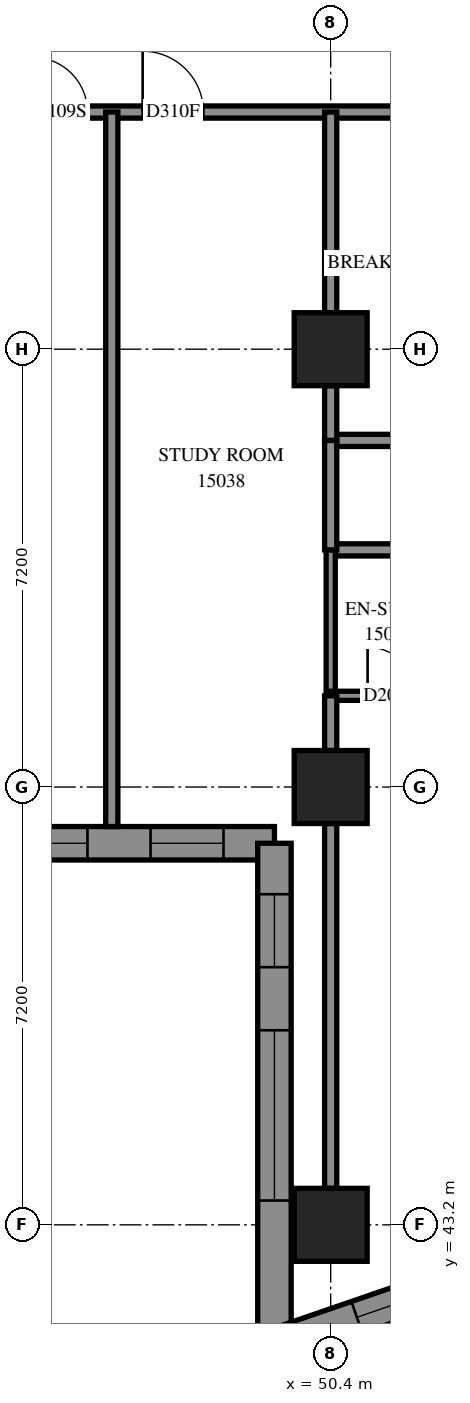
"""IFC4 building model, lengths in metres.
Left out: names, types, materials, properties, quantities, classifications, styles, units other than length and angle.
Written with IfcOpenShell. Run it as: python <this file> out.ifc"""

import sys

from ifc_helpers import new_model, si_unit, direction, frame, frame_2d, origin, origin_2d, place, context, subcontext, project, spatial, polyline, rectangle, outline, extrude, element, fill, save


model = new_model("IFC4")
c1 = context("Model", 3, precision=1e-05, world=origin(), true_north=direction((0.0, 1.0)))
c2 = subcontext(c1, "Body", "Model", "MODEL_VIEW")
j1 = project(units=[si_unit("LENGTHUNIT", "METRE"), si_unit("PLANEANGLEUNIT", "RADIAN")], contexts=[c1])
p1 = place(None, origin())
s1 = spatial("IfcSite", under=j1, at=p1, CompositionType="ELEMENT")
p2 = place(p1, origin())
s2 = spatial("IfcBuilding", under=s1, at=p2, CompositionType="ELEMENT")
p3 = place(p2, frame((0.0, 0.0, 57.6)))
s3 = spatial("IfcBuildingStorey", under=s2, at=p3, CompositionType="ELEMENT", Elevation=57.6)
for number, where, z_axis, x_axis in (
    (1, (50.4, 43.2, 0.0), (0.0, 0.0, 1.0), (1.0, 0.0, 0.0)),
    (2, (50.4, 50.4, 0.0), (0.0, 0.0, 1.0), (1.0, 0.0, 0.0)),
    (3, (50.4, 57.6, 0.0), (0.0, 0.0, 1.0), (1.0, 0.0, 0.0)),
):
    element("IfcColumn", number, at=place(p3, frame(where, z_axis=z_axis, x_axis=x_axis)), inside=s3, PredefinedType="COLUMN", context=c2, shape_type="SweptSolid", body=[
        extrude(rectangle(XDim=1.2, YDim=1.2, at=origin_2d()), origin(), (0.0, 0.0, 1.0), 3.1),
    ])
p4 = place(p3, frame((42.275, 49.475, 0.0), z_axis=(0.0, 0.0, 1.0), x_axis=(1.0, 0.0, 0.0)))
e4 = element("IfcWall", 4, at=p4, inside=s3, PredefinedType="SOLIDWALL", context=c2, shape_type="SweptSolid", body=[
    extrude(outline(polyline([(-0.275, -0.275), (6.925, -0.275), (7.475, 0.275), (0.275, 0.275), (-0.275, -0.275)])), origin(), (0.0, 0.0, 1.0), 3.1),
])
p5 = place(p4, frame((1.325, 0.0, 0.5)))
e5 = element("IfcOpeningElement", 5, at=p5, cuts=e4, PredefinedType="OPENING", context=c2, shape_type="SweptSolid", body=[
    extrude(rectangle(XDim=2.8, YDim=2.45, at=frame_2d((1.4, 1.225))), frame((0.0, 0.285, 0.0), z_axis=(0.0, -1.0, 0.0), x_axis=(1.0, 0.0, 0.0)), (0.0, 0.0, 1.0), 0.57),
])
p6 = place(p4, frame((5.162, 0.0, 0.5)))
e6 = element("IfcOpeningElement", 6, at=p6, cuts=e4, PredefinedType="OPENING", context=c2, shape_type="SweptSolid", body=[
    extrude(rectangle(XDim=1.2, YDim=2.45, at=frame_2d((0.6, 1.225))), frame((0.0, 0.285, 0.0), z_axis=(0.0, -1.0, 0.0), x_axis=(1.0, 0.0, 0.0)), (0.0, 0.0, 1.0), 0.57),
])
p7 = place(p3, frame((49.475, 49.475, 0.0), z_axis=(0.0, 0.0, 1.0), x_axis=(0.0, -1.0, 0.0)))
e7 = element("IfcWall", 7, at=p7, inside=s3, PredefinedType="SOLIDWALL", context=c2, shape_type="SweptSolid", body=[
    extrude(outline(polyline([(0.275, -0.275), (8.647, -0.275), (7.876, 0.275), (-0.275, 0.275), (0.275, -0.275)])), origin(), (0.0, 0.0, 1.0), 3.1),
])
p8 = place(p7, frame((3.075, 0.0, 0.5)))
e8 = element("IfcOpeningElement", 8, at=p8, cuts=e7, PredefinedType="OPENING", context=c2, shape_type="SweptSolid", body=[
    extrude(rectangle(XDim=2.8, YDim=2.45, at=frame_2d((1.4, 1.225))), frame((0.0, 0.285, 0.0), z_axis=(0.0, -1.0, 0.0), x_axis=(1.0, 0.0, 0.0)), (0.0, 0.0, 1.0), 0.57),
])
p9 = place(p7, frame((0.838, 0.0, 0.5)))
e9 = element("IfcOpeningElement", 9, at=p9, cuts=e7, PredefinedType="OPENING", context=c2, shape_type="SweptSolid", body=[
    extrude(rectangle(XDim=1.2, YDim=2.45, at=frame_2d((0.6, 1.225))), frame((0.0, 0.285, 0.0), z_axis=(0.0, -1.0, 0.0), x_axis=(1.0, 0.0, 0.0)), (0.0, 0.0, 1.0), 0.57),
])
p10 = place(p3, frame((49.475, 41.213, 0.0), z_axis=(0.0, 0.0, 1.0), x_axis=(0.9456585559, 0.3251613379, 0.0)))
e10 = element("IfcWall", 10, at=p10, inside=s3, PredefinedType="SOLIDWALL", context=c2, shape_type="SweptSolid", body=[
    extrude(outline(polyline([(-0.385, -0.275), (3.219, -0.275), (3.359, 0.275), (0.385, 0.275), (-0.385, -0.275)])), origin(), (0.0, 0.0, 1.0), 3.1),
])
p11 = place(p10, frame((1.434, 0.0, 0.5)))
e11 = element("IfcOpeningElement", 11, at=p11, cuts=e10, PredefinedType="OPENING", context=c2, shape_type="SweptSolid", body=[
    extrude(rectangle(XDim=1.2, YDim=2.45, at=frame_2d((0.6, 1.225))), frame((0.0, 0.285, 0.0), z_axis=(0.0, -1.0, 0.0), x_axis=(1.0, 0.0, 0.0)), (0.0, 0.0, 1.0), 0.57),
])
p12 = place(p3, frame((28.8, 61.5, 0.0), z_axis=(0.0, 0.0, 1.0), x_axis=(1.0, 0.0, 0.0)))
e12 = element("IfcWall", 12, at=p12, inside=s3, PredefinedType="PARTITIONING", context=c2, shape_type="SweptSolid", body=[
    extrude(rectangle(XDim=24.3, YDim=0.2, at=frame_2d((12.15, 0.0))), origin(), (0.0, 0.0, 1.0), 3.1),
])
p13 = place(p12, frame((3.899, 0.0, 0.0)))
e13 = element("IfcOpeningElement", 13, at=p13, cuts=e12, PredefinedType="OPENING", context=c2, shape_type="SweptSolid", body=[
    extrude(rectangle(XDim=0.9, YDim=2.1, at=frame_2d((0.45, 1.05))), frame((0.0, 0.11, 0.0), z_axis=(0.0, -1.0, 0.0), x_axis=(1.0, 0.0, 0.0)), (0.0, 0.0, 1.0), 0.22),
])
p14 = place(p12, frame((9.5, 0.0, 0.0)))
e14 = element("IfcOpeningElement", 14, at=p14, cuts=e12, PredefinedType="OPENING", context=c2, shape_type="SweptSolid", body=[
    extrude(rectangle(XDim=0.9, YDim=2.1, at=frame_2d((0.45, 1.05))), frame((0.0, 0.11, 0.0), z_axis=(0.0, -1.0, 0.0), x_axis=(1.0, 0.0, 0.0)), (0.0, 0.0, 1.0), 0.22),
])
p15 = place(p12, frame((11.307, 0.0, 0.0)))
e15 = element("IfcOpeningElement", 15, at=p15, cuts=e12, PredefinedType="OPENING", context=c2, shape_type="SweptSolid", body=[
    extrude(rectangle(XDim=1.0, YDim=2.1, at=frame_2d((0.5, 1.05))), frame((0.0, 0.11, 0.0), z_axis=(0.0, -1.0, 0.0), x_axis=(1.0, 0.0, 0.0)), (0.0, 0.0, 1.0), 0.22),
])
p16 = place(p12, frame((16.7, 0.0, 0.0)))
e16 = element("IfcOpeningElement", 16, at=p16, cuts=e12, PredefinedType="OPENING", context=c2, shape_type="SweptSolid", body=[
    extrude(rectangle(XDim=0.9, YDim=2.1, at=frame_2d((0.45, 1.05))), frame((0.0, 0.11, 0.0), z_axis=(0.0, -1.0, 0.0), x_axis=(1.0, 0.0, 0.0)), (0.0, 0.0, 1.0), 0.22),
])
p17 = place(p12, frame((18.508, 0.0, 0.0)))
e17 = element("IfcOpeningElement", 17, at=p17, cuts=e12, PredefinedType="OPENING", context=c2, shape_type="SweptSolid", body=[
    extrude(rectangle(XDim=1.0, YDim=2.1, at=frame_2d((0.5, 1.05))), frame((0.0, 0.11, 0.0), z_axis=(0.0, -1.0, 0.0), x_axis=(1.0, 0.0, 0.0)), (0.0, 0.0, 1.0), 0.22),
])
p18 = place(p12, frame((23.033, 0.0, 0.0)))
e18 = element("IfcOpeningElement", 18, at=p18, cuts=e12, PredefinedType="OPENING", context=c2, shape_type="SweptSolid", body=[
    extrude(rectangle(XDim=1.0, YDim=2.1, at=frame_2d((0.5, 1.05))), frame((0.0, 0.11, 0.0), z_axis=(0.0, -1.0, 0.0), x_axis=(1.0, 0.0, 0.0)), (0.0, 0.0, 1.0), 0.22),
])
p19 = place(p3, frame((46.8, 49.75, 0.0), z_axis=(0.0, 0.0, 1.0), x_axis=(0.0, 1.0, 0.0)))
e19 = element("IfcWall", 19, at=p19, inside=s3, PredefinedType="PARTITIONING", context=c2, shape_type="SweptSolid", body=[
    extrude(rectangle(XDim=11.75, YDim=0.2, at=frame_2d((5.875, 0.0))), origin(), (0.0, 0.0, 1.0), 3.1),
])
p20 = place(p3, frame((50.4, 43.8, 0.0), z_axis=(0.0, 0.0, 1.0), x_axis=(0.0, 1.0, 0.0)))
e20 = element("IfcWall", 20, at=p20, inside=s3, PredefinedType="PARTITIONING", context=c2, shape_type="SweptSolid", body=[
    extrude(rectangle(XDim=6.0, YDim=0.2, at=frame_2d((3.0, 0.0))), origin(), (0.0, 0.0, 1.0), 2.6),
])
p21 = place(p3, frame((50.4, 54.3, 0.0), z_axis=(0.0, 0.0, 1.0), x_axis=(1.0, 0.0, 0.0)))
e21 = element("IfcWall", 21, at=p21, inside=s3, PredefinedType="PARTITIONING", context=c2, shape_type="SweptSolid", body=[
    extrude(rectangle(XDim=4.7, YDim=0.2, at=frame_2d((2.35, 0.0))), origin(), (0.0, 0.0, 1.0), 3.1),
])
p22 = place(p21, frame((2.3, 0.0, 0.0)))
e22 = element("IfcOpeningElement", 22, at=p22, cuts=e21, PredefinedType="OPENING", context=c2, shape_type="SweptSolid", body=[
    extrude(rectangle(XDim=0.9, YDim=2.1, at=frame_2d((0.45, 1.05))), frame((0.0, 0.11, 0.0), z_axis=(0.0, -1.0, 0.0), x_axis=(1.0, 0.0, 0.0)), (0.0, 0.0, 1.0), 0.22),
])
p23 = place(p3, frame((50.4, 58.2, 0.0), z_axis=(0.0, 0.0, 1.0), x_axis=(0.0, 1.0, 0.0)))
e23 = element("IfcWall", 23, at=p23, inside=s3, PredefinedType="PARTITIONING", context=c2, shape_type="SweptSolid", body=[
    extrude(rectangle(XDim=3.3, YDim=0.2, at=frame_2d((1.65, 0.0))), origin(), (0.0, 0.0, 1.0), 3.1),
])
p24 = place(p3, frame((50.4, 56.1, 0.0), z_axis=(0.0, 0.0, 1.0), x_axis=(1.0, 0.0, 0.0)))
e24 = element("IfcWall", 24, at=p24, inside=s3, PredefinedType="PARTITIONING", context=c2, shape_type="SweptSolid", body=[
    extrude(rectangle(XDim=2.7, YDim=0.2, at=frame_2d((1.35, 0.0))), origin(), (0.0, 0.0, 1.0), 3.1),
])
p25 = place(p3, frame((50.4, 51.9, 0.0), z_axis=(0.0, 0.0, 1.0), x_axis=(0.0, 1.0, 0.0)))
e25 = element("IfcWall", 25, at=p25, inside=s3, PredefinedType="PARTITIONING", context=c2, shape_type="SweptSolid", body=[
    extrude(rectangle(XDim=2.4, YDim=0.15, at=frame_2d((1.2, 0.0))), origin(), (0.0, 0.0, 1.0), 3.1),
])
p26 = place(p3, frame((50.4, 51.9, 0.0), z_axis=(0.0, 0.0, 1.0), x_axis=(1.0, 0.0, 0.0)))
e26 = element("IfcWall", 26, at=p26, inside=s3, PredefinedType="PARTITIONING", context=c2, shape_type="SweptSolid", body=[
    extrude(rectangle(XDim=1.9, YDim=0.15, at=frame_2d((0.95, 0.0))), origin(), (0.0, 0.0, 1.0), 3.1),
])
p27 = place(p26, frame((0.607, 0.0, 0.0)))
e27 = element("IfcOpeningElement", 27, at=p27, cuts=e26, PredefinedType="OPENING", context=c2, shape_type="SweptSolid", body=[
    extrude(rectangle(XDim=0.8, YDim=2.1, at=frame_2d((0.4, 1.05))), frame((0.0, 0.085, 0.0), z_axis=(0.0, -1.0, 0.0), x_axis=(1.0, 0.0, 0.0)), (0.0, 0.0, 1.0), 0.17),
])
p28 = place(p3, frame((50.4, 54.3, 0.0), z_axis=(0.0, 0.0, 1.0), x_axis=(0.0, 1.0, 0.0)))
e28 = element("IfcWall", 28, at=p28, inside=s3, PredefinedType="PARTITIONING", context=c2, shape_type="SweptSolid", body=[
    extrude(rectangle(XDim=1.8, YDim=0.2, at=frame_2d((0.9, 0.0))), origin(), (0.0, 0.0, 1.0), 3.1),
])
for number, where, z_axis, x_axis in (
    (29, (50.4, 51.0, 0.0), (0.0, 0.0, 1.0), (0.0, 1.0, 0.0)),
    (30, (50.4, 56.1, 0.0), (0.0, 0.0, 1.0), (0.0, 1.0, 0.0)),
):
    element("IfcWall", number, at=place(p3, frame(where, z_axis=z_axis, x_axis=x_axis)), inside=s3, PredefinedType="PARTITIONING", context=c2, shape_type="SweptSolid", body=[
        extrude(rectangle(XDim=0.9, YDim=0.2, at=frame_2d((0.45, 0.0))), origin(), (0.0, 0.0, 1.0), 3.1),
    ])
p29 = place(p5, origin())
e31 = element("IfcWindow", 31, at=p29, inside=s3, PartitioningType="SINGLE_PANEL", PredefinedType="WINDOW", context=c2, shape_type="SweptSolid", body=[
    extrude(rectangle(XDim=2.8, YDim=2.45, at=frame_2d((1.4, 1.225))), frame((0.0, 0.155, 0.0), z_axis=(0.0, -1.0, 0.0), x_axis=(1.0, 0.0, 0.0)), (0.0, 0.0, 1.0), 0.06),
])
fill(e5, e31)
p30 = place(p6, origin())
e32 = element("IfcWindow", 32, at=p30, inside=s3, PartitioningType="SINGLE_PANEL", PredefinedType="WINDOW", context=c2, shape_type="SweptSolid", body=[
    extrude(rectangle(XDim=1.2, YDim=2.45, at=frame_2d((0.6, 1.225))), frame((0.0, 0.155, 0.0), z_axis=(0.0, -1.0, 0.0), x_axis=(1.0, 0.0, 0.0)), (0.0, 0.0, 1.0), 0.06),
])
fill(e6, e32)
p31 = place(p8, origin())
e33 = element("IfcWindow", 33, at=p31, inside=s3, PartitioningType="SINGLE_PANEL", PredefinedType="WINDOW", context=c2, shape_type="SweptSolid", body=[
    extrude(rectangle(XDim=2.8, YDim=2.45, at=frame_2d((1.4, 1.225))), frame((0.0, 0.155, 0.0), z_axis=(0.0, -1.0, 0.0), x_axis=(1.0, 0.0, 0.0)), (0.0, 0.0, 1.0), 0.06),
])
fill(e8, e33)
p32 = place(p9, origin())
e34 = element("IfcWindow", 34, at=p32, inside=s3, PartitioningType="SINGLE_PANEL", PredefinedType="WINDOW", context=c2, shape_type="SweptSolid", body=[
    extrude(rectangle(XDim=1.2, YDim=2.45, at=frame_2d((0.6, 1.225))), frame((0.0, 0.155, 0.0), z_axis=(0.0, -1.0, 0.0), x_axis=(1.0, 0.0, 0.0)), (0.0, 0.0, 1.0), 0.06),
])
fill(e9, e34)
p33 = place(p11, origin())
e35 = element("IfcWindow", 35, at=p33, inside=s3, PartitioningType="SINGLE_PANEL", PredefinedType="WINDOW", context=c2, shape_type="SweptSolid", body=[
    extrude(rectangle(XDim=1.2, YDim=2.45, at=frame_2d((0.6, 1.225))), frame((0.0, 0.155, 0.0), z_axis=(0.0, -1.0, 0.0), x_axis=(1.0, 0.0, 0.0)), (0.0, 0.0, 1.0), 0.06),
])
fill(e11, e35)
p34 = place(p16, origin())
e36 = element("IfcDoor", 36, at=p34, inside=s3, OperationType="SINGLE_SWING_LEFT", PredefinedType="DOOR", context=c2, shape_type="SweptSolid", body=[
    extrude(rectangle(XDim=0.9, YDim=2.1, at=frame_2d((0.45, 1.05))), frame((0.0, 0.025, 0.0), z_axis=(0.0, -1.0, 0.0), x_axis=(1.0, 0.0, 0.0)), (0.0, 0.0, 1.0), 0.05),
])
fill(e16, e36)
p35 = place(p17, origin())
e37 = element("IfcDoor", 37, at=p35, inside=s3, OperationType="SINGLE_SWING_RIGHT", PredefinedType="DOOR", context=c2, shape_type="SweptSolid", body=[
    extrude(rectangle(XDim=1.0, YDim=2.1, at=frame_2d((0.5, 1.05))), frame((0.0, 0.025, 0.0), z_axis=(0.0, -1.0, 0.0), x_axis=(1.0, 0.0, 0.0)), (0.0, 0.0, 1.0), 0.05),
])
fill(e17, e37)
p36 = place(p27, origin())
e38 = element("IfcDoor", 38, at=p36, inside=s3, OperationType="SINGLE_SWING_RIGHT", PredefinedType="DOOR", context=c2, shape_type="SweptSolid", body=[
    extrude(rectangle(XDim=0.8, YDim=2.1, at=frame_2d((0.4, 1.05))), frame((0.0, 0.025, 0.0), z_axis=(0.0, -1.0, 0.0), x_axis=(1.0, 0.0, 0.0)), (0.0, 0.0, 1.0), 0.05),
])
fill(e27, e38)
save(model, sys.argv[1])
